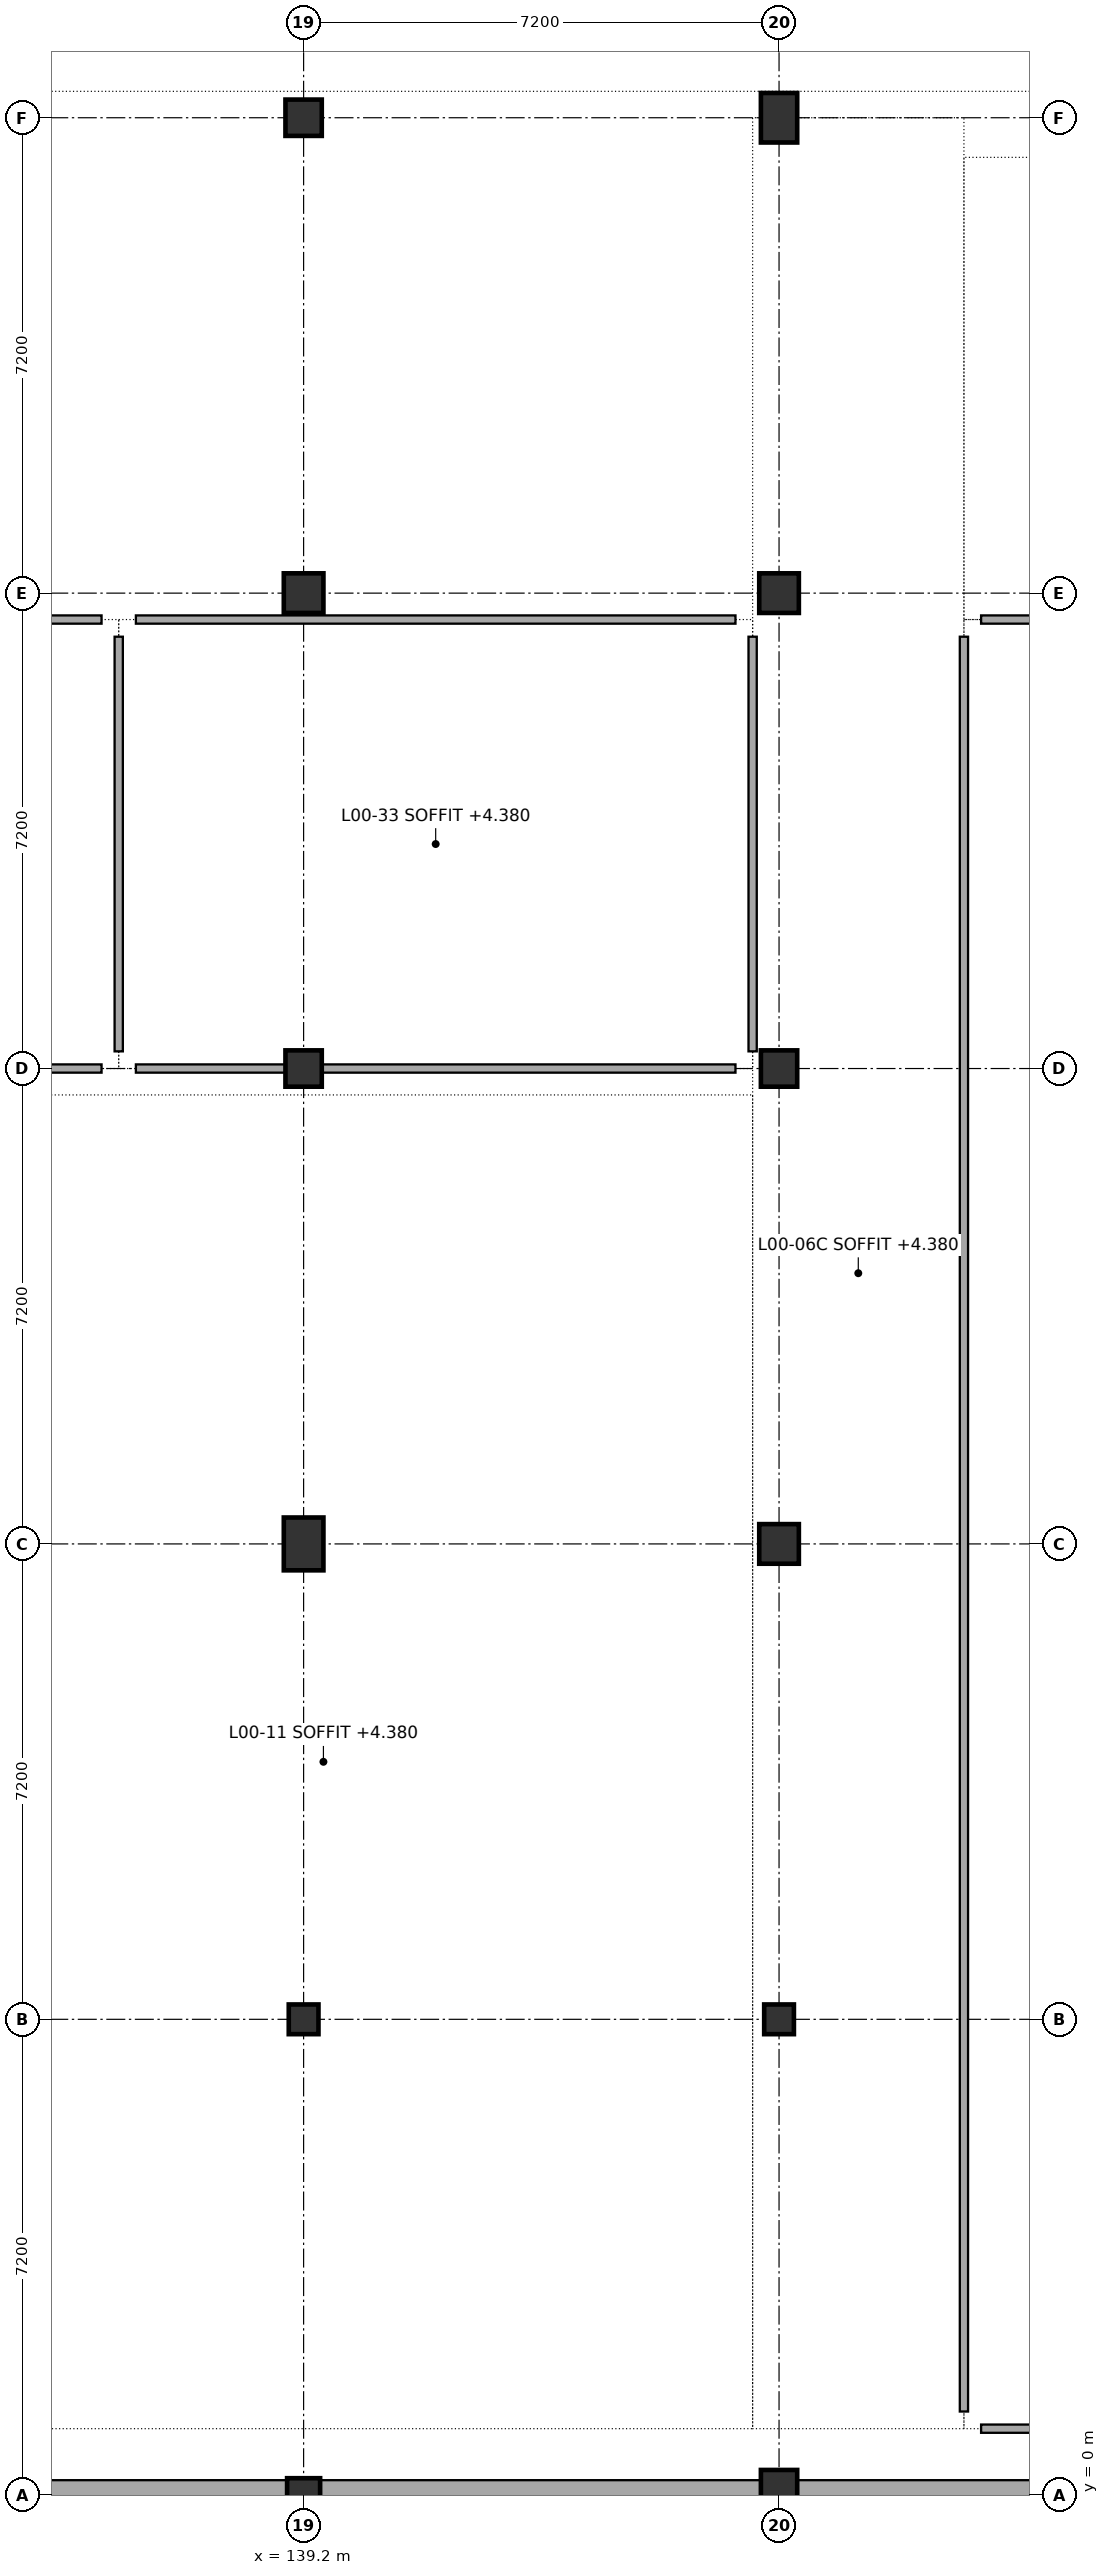
"""IFC4 building model, lengths in metres.
Left out: names, types, materials, properties, quantities, classifications, styles, units other than length and angle.
Written with IfcOpenShell. Run it as: python <this file> out.ifc"""

import sys

from ifc_helpers import new_model, si_unit, direction, frame, frame_2d, origin, origin_2d, place, context, subcontext, project, spatial, rectangle, extrude, element, fill, save


model = new_model("IFC4")
c1 = context("Model", 3, precision=1e-05, world=origin(), true_north=direction((0.0, 1.0)))
c2 = subcontext(c1, "Body", "Model", "MODEL_VIEW")
j1 = project(units=[si_unit("LENGTHUNIT", "METRE"), si_unit("PLANEANGLEUNIT", "RADIAN")], contexts=[c1])
p1 = place(None, origin())
s1 = spatial("IfcSite", under=j1, at=p1, CompositionType="ELEMENT")
p2 = place(p1, origin())
s2 = spatial("IfcBuilding", under=s1, at=p2, CompositionType="ELEMENT")
p3 = place(p2, origin())
s3 = spatial("IfcBuildingStorey", under=s2, at=p3, CompositionType="ELEMENT", Elevation=0.0)
p4 = place(p3, frame((139.2, 0.0, 0.0), z_axis=(0.0, 0.0, 1.0), x_axis=(1.0, 0.0, 0.0)))
e1 = element("IfcColumn", 1, at=p4, inside=s3, PredefinedType="COLUMN", context=c2, shape_type="SweptSolid", body=[
    extrude(rectangle(XDim=0.5, YDim=0.5, at=origin_2d()), origin(), (0.0, 0.0, 1.0), 4.8),
])
p5 = place(p3, frame((139.2, 7.2, 0.0), z_axis=(0.0, 0.0, 1.0), x_axis=(1.0, 0.0, 0.0)))
e2 = element("IfcColumn", 2, at=p5, inside=s3, PredefinedType="COLUMN", context=c2, shape_type="SweptSolid", body=[
    extrude(rectangle(XDim=0.45, YDim=0.45, at=origin_2d()), origin(), (0.0, 0.0, 1.0), 4.8),
])
p6 = place(p3, frame((139.2, 14.4, 0.0), z_axis=(0.0, 0.0, 1.0), x_axis=(1.0, 0.0, 0.0)))
e3 = element("IfcColumn", 3, at=p6, inside=s3, PredefinedType="COLUMN", context=c2, shape_type="SweptSolid", body=[
    extrude(rectangle(XDim=0.6, YDim=0.8, at=origin_2d()), origin(), (0.0, 0.0, 1.0), 4.8),
])
p7 = place(p3, frame((139.2, 21.6, 0.0), z_axis=(0.0, 0.0, 1.0), x_axis=(1.0, 0.0, 0.0)))
e4 = element("IfcColumn", 4, at=p7, inside=s3, PredefinedType="COLUMN", context=c2, shape_type="SweptSolid", body=[
    extrude(rectangle(XDim=0.55, YDim=0.55, at=origin_2d()), origin(), (0.0, 0.0, 1.0), 4.8),
])
p8 = place(p3, frame((139.2, 28.8, 0.0), z_axis=(0.0, 0.0, 1.0), x_axis=(1.0, 0.0, 0.0)))
e5 = element("IfcColumn", 5, at=p8, inside=s3, PredefinedType="COLUMN", context=c2, shape_type="SweptSolid", body=[
    extrude(rectangle(XDim=0.6, YDim=0.6, at=origin_2d()), origin(), (0.0, 0.0, 1.0), 4.8),
])
p9 = place(p3, frame((139.2, 36.0, 0.0), z_axis=(0.0, 0.0, 1.0), x_axis=(1.0, 0.0, 0.0)))
e6 = element("IfcColumn", 6, at=p9, inside=s3, PredefinedType="COLUMN", context=c2, shape_type="SweptSolid", body=[
    extrude(rectangle(XDim=0.55, YDim=0.55, at=origin_2d()), origin(), (0.0, 0.0, 1.0), 4.8),
])
p10 = place(p3, frame((146.4, 0.0, 0.0), z_axis=(0.0, 0.0, 1.0), x_axis=(1.0, 0.0, 0.0)))
e7 = element("IfcColumn", 7, at=p10, inside=s3, PredefinedType="COLUMN", context=c2, shape_type="SweptSolid", body=[
    extrude(rectangle(XDim=0.55, YDim=0.75, at=origin_2d()), origin(), (0.0, 0.0, 1.0), 4.8),
])
p11 = place(p3, frame((146.4, 7.2, 0.0), z_axis=(0.0, 0.0, 1.0), x_axis=(1.0, 0.0, 0.0)))
e8 = element("IfcColumn", 8, at=p11, inside=s3, PredefinedType="COLUMN", context=c2, shape_type="SweptSolid", body=[
    extrude(rectangle(XDim=0.45, YDim=0.45, at=origin_2d()), origin(), (0.0, 0.0, 1.0), 4.8),
])
p12 = place(p3, frame((146.4, 14.4, 0.0), z_axis=(0.0, 0.0, 1.0), x_axis=(1.0, 0.0, 0.0)))
e9 = element("IfcColumn", 9, at=p12, inside=s3, PredefinedType="COLUMN", context=c2, shape_type="SweptSolid", body=[
    extrude(rectangle(XDim=0.6, YDim=0.6, at=origin_2d()), origin(), (0.0, 0.0, 1.0), 4.8),
])
p13 = place(p3, frame((146.4, 21.6, 0.0), z_axis=(0.0, 0.0, 1.0), x_axis=(1.0, 0.0, 0.0)))
e10 = element("IfcColumn", 10, at=p13, inside=s3, PredefinedType="COLUMN", context=c2, shape_type="SweptSolid", body=[
    extrude(rectangle(XDim=0.55, YDim=0.55, at=origin_2d()), origin(), (0.0, 0.0, 1.0), 4.8),
])
p14 = place(p3, frame((146.4, 28.8, 0.0), z_axis=(0.0, 0.0, 1.0), x_axis=(1.0, 0.0, 0.0)))
e11 = element("IfcColumn", 11, at=p14, inside=s3, PredefinedType="COLUMN", context=c2, shape_type="SweptSolid", body=[
    extrude(rectangle(XDim=0.6, YDim=0.6, at=origin_2d()), origin(), (0.0, 0.0, 1.0), 4.8),
])
p15 = place(p3, frame((146.4, 36.0, 0.0), z_axis=(0.0, 0.0, 1.0), x_axis=(1.0, 0.0, 0.0)))
e12 = element("IfcColumn", 12, at=p15, inside=s3, PredefinedType="COLUMN", context=c2, shape_type="SweptSolid", body=[
    extrude(rectangle(XDim=0.55, YDim=0.75, at=origin_2d()), origin(), (0.0, 0.0, 1.0), 4.8),
])
p16 = place(p3, frame((153.6, 0.0, 0.0), z_axis=(0.0, 0.0, 1.0), x_axis=(-1.0, 0.0, 0.0)))
e13 = element("IfcWall", 13, at=p16, inside=s3, PredefinedType="STANDARD", context=c2, shape_type="SweptSolid", body=[
    extrude(rectangle(XDim=7.2, YDim=0.44, at=frame_2d((3.6, 0.0))), origin(), (0.0, 0.0, 1.0), 4.44),
])
p17 = place(p16, frame((2.7, 0.0, 0.8)))
e14 = element("IfcOpeningElement", 14, at=p17, cuts=e13, PredefinedType="OPENING", context=c2, shape_type="SweptSolid", body=[
    extrude(rectangle(XDim=1.8, YDim=1.65, at=frame_2d((0.9, 0.825))), frame((0.0, 0.23, 0.0), z_axis=(0.0, -1.0, 0.0), x_axis=(1.0, 0.0, 0.0)), (0.0, 0.0, 1.0), 0.46),
])
p18 = place(p3, frame((146.4, 0.0, 0.0), z_axis=(0.0, 0.0, 1.0), x_axis=(-1.0, 0.0, 0.0)))
e15 = element("IfcWall", 15, at=p18, inside=s3, PredefinedType="STANDARD", context=c2, shape_type="SweptSolid", body=[
    extrude(rectangle(XDim=7.2, YDim=0.44, at=frame_2d((3.6, 0.0))), origin(), (0.0, 0.0, 1.0), 4.44),
])
p19 = place(p18, frame((2.9, 0.0, 0.8)))
e16 = element("IfcOpeningElement", 16, at=p19, cuts=e15, PredefinedType="OPENING", context=c2, shape_type="SweptSolid", body=[
    extrude(rectangle(XDim=1.4, YDim=2.05, at=frame_2d((0.7, 1.025))), frame((0.0, 0.23, 0.0), z_axis=(0.0, -1.0, 0.0), x_axis=(1.0, 0.0, 0.0)), (0.0, 0.0, 1.0), 0.46),
])
p20 = place(p3, frame((139.2, 0.0, 0.0), z_axis=(0.0, 0.0, 1.0), x_axis=(-1.0, 0.0, 0.0)))
e17 = element("IfcWall", 17, at=p20, inside=s3, PredefinedType="STANDARD", context=c2, shape_type="SweptSolid", body=[
    extrude(rectangle(XDim=7.2, YDim=0.44, at=frame_2d((3.6, 0.0))), origin(), (0.0, 0.0, 1.0), 4.44),
])
p21 = place(p20, frame((2.7, 0.0, 0.8)))
e18 = element("IfcOpeningElement", 18, at=p21, cuts=e17, PredefinedType="OPENING", context=c2, shape_type="SweptSolid", body=[
    extrude(rectangle(XDim=1.8, YDim=2.05, at=frame_2d((0.9, 1.025))), frame((0.0, 0.23, 0.0), z_axis=(0.0, -1.0, 0.0), x_axis=(1.0, 0.0, 0.0)), (0.0, 0.0, 1.0), 0.46),
])
p22 = place(p3, frame((149.46, 1.0, 0.0), z_axis=(0.0, 0.0, 1.0), x_axis=(1.0, 0.0, 0.0)))
e19 = element("IfcWall", 19, at=p22, inside=s3, PredefinedType="PARTITIONING", context=c2, shape_type="SweptSolid", body=[
    extrude(rectangle(XDim=17.28, YDim=0.125, at=frame_2d((8.64, 0.0))), origin(), (0.0, 0.0, 1.0), 4.44),
])
p23 = place(p3, frame((166.74, 28.4, 0.0), z_axis=(0.0, 0.0, 1.0), x_axis=(-1.0, 0.0, 0.0)))
e20 = element("IfcWall", 20, at=p23, inside=s3, PredefinedType="PARTITIONING", context=c2, shape_type="SweptSolid", body=[
    extrude(rectangle(XDim=17.28, YDim=0.125, at=frame_2d((8.64, 0.0))), origin(), (0.0, 0.0, 1.0), 3.515),
])
p24 = place(p3, frame((149.2, 28.14, 0.0), z_axis=(0.0, 0.0, 1.0), x_axis=(0.0, -1.0, 0.0)))
e21 = element("IfcWall", 21, at=p24, inside=s3, PredefinedType="PARTITIONING", context=c2, shape_type="SweptSolid", body=[
    extrude(rectangle(XDim=26.88, YDim=0.125, at=frame_2d((13.44, 0.0))), origin(), (0.0, 0.0, 1.0), 4.44),
])
p25 = place(p24, frame((12.59, 0.0, 0.0)))
e22 = element("IfcOpeningElement", 22, at=p25, cuts=e21, PredefinedType="OPENING", context=c2, shape_type="SweptSolid", body=[
    extrude(rectangle(XDim=1.7, YDim=2.2, at=frame_2d((0.85, 1.1))), frame((0.0, 0.073, 0.0), z_axis=(0.0, -1.0, 0.0), x_axis=(1.0, 0.0, 0.0)), (0.0, 0.0, 1.0), 0.145),
])
p26 = place(p3, frame((136.66, 21.6, 0.0), z_axis=(0.0, 0.0, 1.0), x_axis=(1.0, 0.0, 0.0)))
e23 = element("IfcWall", 23, at=p26, inside=s3, PredefinedType="PARTITIONING", context=c2, shape_type="SweptSolid", body=[
    extrude(rectangle(XDim=9.08, YDim=0.125, at=frame_2d((4.54, 0.0))), origin(), (0.0, 0.0, 1.0), 3.665),
])
p27 = place(p3, frame((146.0, 21.86, 0.0), z_axis=(0.0, 0.0, 1.0), x_axis=(0.0, 1.0, 0.0)))
e24 = element("IfcWall", 24, at=p27, inside=s3, PredefinedType="PARTITIONING", context=c2, shape_type="SweptSolid", body=[
    extrude(rectangle(XDim=6.28, YDim=0.125, at=frame_2d((3.14, 0.0))), origin(), (0.0, 0.0, 1.0), 3.615),
])
p28 = place(p27, frame((2.67, 0.0, 0.0)))
e25 = element("IfcOpeningElement", 25, at=p28, cuts=e24, PredefinedType="OPENING", context=c2, shape_type="SweptSolid", body=[
    extrude(rectangle(XDim=0.94, YDim=2.1, at=frame_2d((0.47, 1.05))), frame((0.0, 0.073, 0.0), z_axis=(0.0, -1.0, 0.0), x_axis=(1.0, 0.0, 0.0)), (0.0, 0.0, 1.0), 0.145),
])
p29 = place(p3, frame((145.74, 28.4, 0.0), z_axis=(0.0, 0.0, 1.0), x_axis=(-1.0, 0.0, 0.0)))
e26 = element("IfcWall", 26, at=p29, inside=s3, PredefinedType="PARTITIONING", context=c2, shape_type="SweptSolid", body=[
    extrude(rectangle(XDim=9.08, YDim=0.125, at=frame_2d((4.54, 0.0))), origin(), (0.0, 0.0, 1.0), 3.665),
])
p30 = place(p3, frame((136.4, 28.14, 0.0), z_axis=(0.0, 0.0, 1.0), x_axis=(0.0, -1.0, 0.0)))
e27 = element("IfcWall", 27, at=p30, inside=s3, PredefinedType="PARTITIONING", context=c2, shape_type="SweptSolid", body=[
    extrude(rectangle(XDim=6.28, YDim=0.125, at=frame_2d((3.14, 0.0))), origin(), (0.0, 0.0, 1.0), 4.44),
])
p31 = place(p3, frame((133.26, 21.6, 0.0), z_axis=(0.0, 0.0, 1.0), x_axis=(1.0, 0.0, 0.0)))
e28 = element("IfcWall", 28, at=p31, inside=s3, PredefinedType="PARTITIONING", context=c2, shape_type="SweptSolid", body=[
    extrude(rectangle(XDim=2.88, YDim=0.125, at=frame_2d((1.44, 0.0))), origin(), (0.0, 0.0, 1.0), 3.715),
])
p32 = place(p3, frame((136.14, 28.4, 0.0), z_axis=(0.0, 0.0, 1.0), x_axis=(-1.0, 0.0, 0.0)))
e29 = element("IfcWall", 29, at=p32, inside=s3, PredefinedType="PARTITIONING", context=c2, shape_type="SweptSolid", body=[
    extrude(rectangle(XDim=2.88, YDim=0.125, at=frame_2d((1.44, 0.0))), origin(), (0.0, 0.0, 1.0), 3.665),
])
p33 = place(p32, frame((0.97, 0.0, 0.0)))
e30 = element("IfcOpeningElement", 30, at=p33, cuts=e29, PredefinedType="OPENING", context=c2, shape_type="SweptSolid", body=[
    extrude(rectangle(XDim=0.94, YDim=2.1, at=frame_2d((0.47, 1.05))), frame((0.0, 0.073, 0.0), z_axis=(0.0, -1.0, 0.0), x_axis=(1.0, 0.0, 0.0)), (0.0, 0.0, 1.0), 0.145),
])
p34 = place(p17, origin())
e31 = element("IfcWindow", 31, at=p34, inside=s3, PartitioningType="SINGLE_PANEL", PredefinedType="WINDOW", context=c2, shape_type="SweptSolid", body=[
    extrude(rectangle(XDim=1.8, YDim=1.65, at=frame_2d((0.9, 0.825))), frame((0.0, 0.03, 0.0), z_axis=(0.0, -1.0, 0.0), x_axis=(1.0, 0.0, 0.0)), (0.0, 0.0, 1.0), 0.06),
])
fill(e14, e31)
p35 = place(p19, origin())
e32 = element("IfcWindow", 32, at=p35, inside=s3, PartitioningType="SINGLE_PANEL", PredefinedType="WINDOW", context=c2, shape_type="SweptSolid", body=[
    extrude(rectangle(XDim=1.4, YDim=2.05, at=frame_2d((0.7, 1.025))), frame((0.0, 0.03, 0.0), z_axis=(0.0, -1.0, 0.0), x_axis=(1.0, 0.0, 0.0)), (0.0, 0.0, 1.0), 0.06),
])
fill(e16, e32)
p36 = place(p21, origin())
e33 = element("IfcWindow", 33, at=p36, inside=s3, PartitioningType="SINGLE_PANEL", PredefinedType="WINDOW", context=c2, shape_type="SweptSolid", body=[
    extrude(rectangle(XDim=1.8, YDim=2.05, at=frame_2d((0.9, 1.025))), frame((0.0, 0.03, 0.0), z_axis=(0.0, -1.0, 0.0), x_axis=(1.0, 0.0, 0.0)), (0.0, 0.0, 1.0), 0.06),
])
fill(e18, e33)
p37 = place(p25, origin())
e34 = element("IfcDoor", 34, at=p37, inside=s3, OperationType="DOUBLE_DOOR_SINGLE_SWING", PredefinedType="DOOR", context=c2, shape_type="SweptSolid", body=[
    extrude(rectangle(XDim=1.7, YDim=2.2, at=frame_2d((0.85, 1.1))), frame((0.0, 0.025, 0.0), z_axis=(0.0, -1.0, 0.0), x_axis=(1.0, 0.0, 0.0)), (0.0, 0.0, 1.0), 0.05),
])
fill(e22, e34)
p38 = place(p28, origin())
e35 = element("IfcDoor", 35, at=p38, inside=s3, OperationType="SINGLE_SWING_LEFT", PredefinedType="DOOR", context=c2, shape_type="SweptSolid", body=[
    extrude(rectangle(XDim=0.94, YDim=2.1, at=frame_2d((0.47, 1.05))), frame((0.0, 0.025, 0.0), z_axis=(0.0, -1.0, 0.0), x_axis=(1.0, 0.0, 0.0)), (0.0, 0.0, 1.0), 0.05),
])
fill(e25, e35)
save(model, sys.argv[1])
